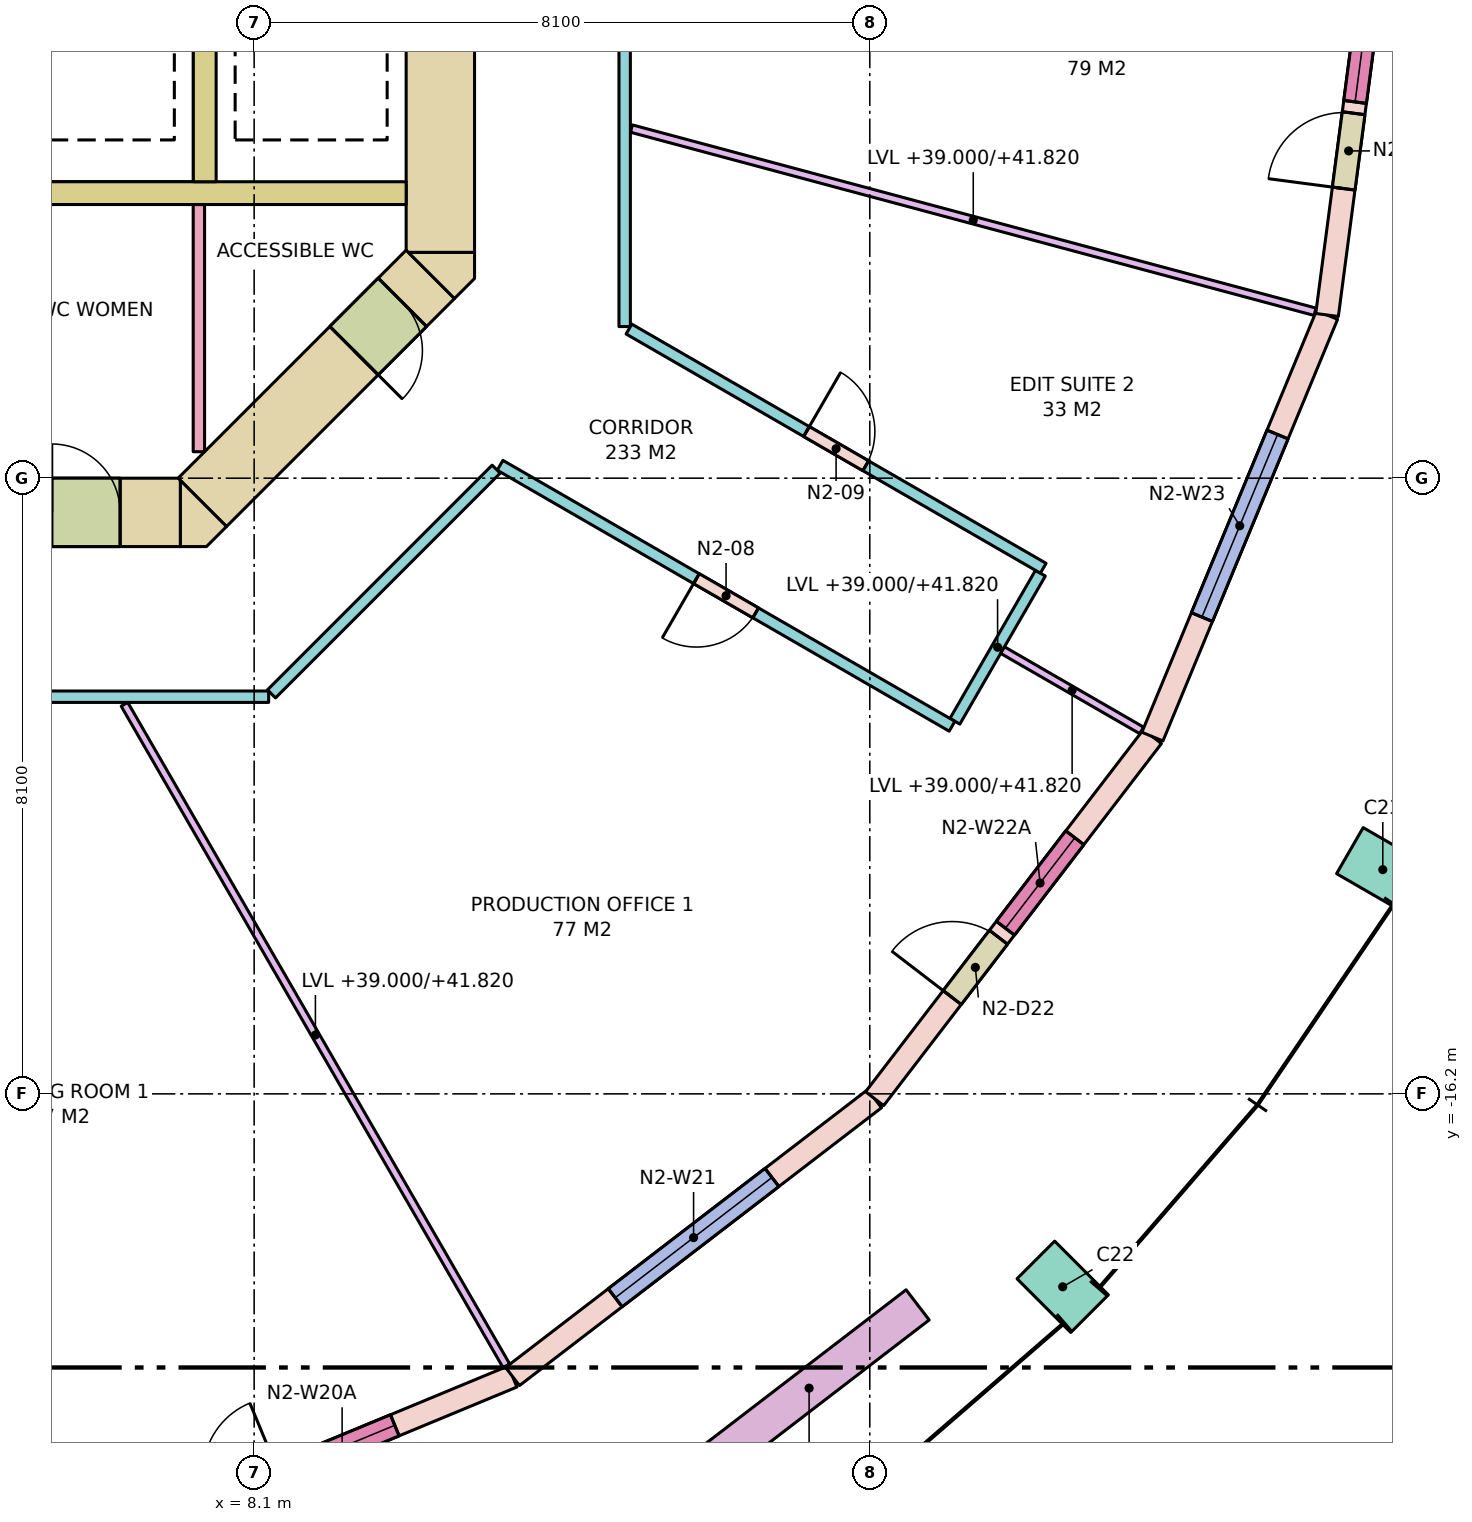
"""IFC4 building model, lengths in metres.
Left out: names, types, materials, properties, quantities, classifications, styles, units other than length and angle.
Written with IfcOpenShell. Run it as: python <this file> out.ifc"""

import sys

from ifc_helpers import new_model, si_unit, direction, frame, frame_2d, origin, origin_2d, place, context, subcontext, project, spatial, polyline, rectangle, outline, extrude, element, fill, save


model = new_model("IFC4")
c1 = context("Model", 3, precision=1e-05, world=origin(), true_north=direction((0.0, 1.0)))
c2 = subcontext(c1, "Body", "Model", "MODEL_VIEW")
j1 = project(units=[si_unit("LENGTHUNIT", "METRE"), si_unit("PLANEANGLEUNIT", "RADIAN")], contexts=[c1])
p1 = place(None, origin())
s1 = spatial("IfcSite", under=j1, at=p1, CompositionType="ELEMENT")
p2 = place(p1, origin())
s2 = spatial("IfcBuilding", under=s1, at=p2, CompositionType="ELEMENT")
p3 = place(p2, frame((0.0, 0.0, 39.0)))
s3 = spatial("IfcBuildingStorey", under=s2, at=p3, CompositionType="ELEMENT", Elevation=39.0)
for number, where, z_axis, x_axis in (
    (1, (18.738, -18.738, 0.0), (0.0, 0.0, 1.0), (0.707, 0.707, 0.0)),
    (2, (22.95, -13.25, 0.0), (0.0, 0.0, 1.0), (0.5, 0.866, 0.0)),
):
    element("IfcColumn", number, at=place(p3, frame(where, z_axis=z_axis, x_axis=x_axis)), inside=s3, PredefinedType="COLUMN", context=c2, shape_type="SweptSolid", body=[
        extrude(rectangle(XDim=0.7, YDim=1.0, at=origin_2d()), origin(), (0.0, 0.0, 1.0), 4.0),
    ])
p4 = place(p3, frame((-7.13, -8.55, -0.28), z_axis=(0.0, 0.0, 1.0), x_axis=(1.0, 0.0, 0.0)))
e3 = element("IfcWall", 3, at=p4, inside=s3, PredefinedType="SHEAR", context=c2, shape_type="SweptSolid", body=[
    extrude(rectangle(XDim=14.26, YDim=0.9, at=frame_2d((7.13, 0.0))), origin(), (0.0, 0.0, 1.0), 4.0),
])
p5 = place(p4, frame((8.08, 0.0, 0.28)))
e4 = element("IfcOpeningElement", 4, at=p5, cuts=e3, PredefinedType="OPENING", context=c2, shape_type="SweptSolid", body=[
    extrude(rectangle(XDim=0.7, YDim=2.1, at=frame_2d((0.35, 1.05))), frame((0.0, 0.46, 0.0), z_axis=(0.0, -1.0, 0.0), x_axis=(1.0, 0.0, 0.0)), (0.0, 0.0, 1.0), 0.92),
])
p6 = place(p4, frame((6.205, 0.0, 0.28)))
e5 = element("IfcOpeningElement", 5, at=p6, cuts=e3, PredefinedType="OPENING", context=c2, shape_type="SweptSolid", body=[
    extrude(rectangle(XDim=0.9, YDim=2.1, at=frame_2d((0.45, 1.05))), frame((0.0, 0.46, 0.0), z_axis=(0.0, -1.0, 0.0), x_axis=(1.0, 0.0, 0.0)), (0.0, 0.0, 1.0), 0.92),
])
p7 = place(p4, frame((9.967, 0.0, 0.28)))
e6 = element("IfcOpeningElement", 6, at=p7, cuts=e3, PredefinedType="OPENING", context=c2, shape_type="SweptSolid", body=[
    extrude(rectangle(XDim=0.9, YDim=2.1, at=frame_2d((0.45, 1.05))), frame((0.0, 0.46, 0.0), z_axis=(0.0, -1.0, 0.0), x_axis=(1.0, 0.0, 0.0)), (0.0, 0.0, 1.0), 0.92),
])
p8 = place(p4, frame((12.567, 0.0, 0.28)))
e7 = element("IfcOpeningElement", 7, at=p8, cuts=e3, PredefinedType="OPENING", context=c2, shape_type="SweptSolid", body=[
    extrude(rectangle(XDim=0.9, YDim=2.1, at=frame_2d((0.45, 1.05))), frame((0.0, 0.46, 0.0), z_axis=(0.0, -1.0, 0.0), x_axis=(1.0, 0.0, 0.0)), (0.0, 0.0, 1.0), 0.92),
])
p9 = place(p3, frame((10.55, -5.13, -0.28), z_axis=(0.0, 0.0, 1.0), x_axis=(0.0, 1.0, 0.0)))
e8 = element("IfcWall", 8, at=p9, inside=s3, PredefinedType="SHEAR", context=c2, shape_type="SweptSolid", body=[
    extrude(rectangle(XDim=10.26, YDim=0.9, at=frame_2d((5.13, 0.0))), origin(), (0.0, 0.0, 1.0), 4.0),
])
p10 = place(p9, frame((4.13, 0.0, 0.28)))
e9 = element("IfcOpeningElement", 9, at=p10, cuts=e8, PredefinedType="OPENING", context=c2, shape_type="SweptSolid", body=[
    extrude(rectangle(XDim=2.0, YDim=2.1, at=frame_2d((1.0, 1.05))), frame((0.0, 0.46, 0.0), z_axis=(0.0, -1.0, 0.0), x_axis=(1.0, 0.0, 0.0)), (0.0, 0.0, 1.0), 0.92),
])
p11 = place(p3, frame((10.418, -5.418, -0.28), z_axis=(0.0, 0.0, 1.0), x_axis=(-0.707106781187, -0.707106781187, 0.0)))
e10 = element("IfcWall", 10, at=p11, inside=s3, PredefinedType="SHEAR", context=c2, shape_type="SweptSolid", body=[
    extrude(rectangle(XDim=4.243, YDim=0.9, at=frame_2d((2.121, 0.0))), origin(), (0.0, 0.0, 1.0), 4.0),
])
p12 = place(p11, frame((0.52, 0.0, 0.28)))
e11 = element("IfcOpeningElement", 11, at=p12, cuts=e10, PredefinedType="OPENING", context=c2, shape_type="SweptSolid", body=[
    extrude(rectangle(XDim=0.9, YDim=2.1, at=frame_2d((0.45, 1.05))), frame((0.0, 0.46, 0.0), z_axis=(0.0, -1.0, 0.0), x_axis=(1.0, 0.0, 0.0)), (0.0, 0.0, 1.0), 0.92),
])
p13 = place(p3, frame((0.0, 0.0, -0.28)))
e12 = element("IfcWall", 12, at=p13, inside=s3, PredefinedType="SHEAR", context=c2, shape_type="SweptSolid", body=[
    extrude(outline(polyline([(7.473, -9.0), (7.13, -9.0), (7.13, -8.13), (7.736, -8.736), (7.473, -9.0)])), origin(), (0.0, 0.0, 1.0), 4.0),
])
p14 = place(p3, frame((0.0, 0.0, -0.28)))
e13 = element("IfcWall", 13, at=p14, inside=s3, PredefinedType="SHEAR", context=c2, shape_type="SweptSolid", body=[
    extrude(outline(polyline([(11.0, -5.473), (10.736, -5.736), (10.13, -5.13), (11.0, -5.13), (11.0, -5.473)])), origin(), (0.0, 0.0, 1.0), 4.0),
])
p15 = place(p3, frame((2.0, -4.35, 0.0), z_axis=(0.0, 0.0, 1.0), x_axis=(1.0, 0.0, 0.0)))
e14 = element("IfcWall", 14, at=p15, inside=s3, PredefinedType="SOLIDWALL", context=c2, shape_type="SweptSolid", body=[
    extrude(rectangle(XDim=8.1, YDim=0.3, at=frame_2d((4.05, 0.0))), origin(), (0.0, 0.0, 1.0), 3.72),
])
p16 = place(p3, frame((7.45, -4.2, 0.0), z_axis=(0.0, 0.0, 1.0), x_axis=(0.0, 1.0, 0.0)))
e15 = element("IfcWall", 15, at=p16, inside=s3, PredefinedType="SOLIDWALL", context=c2, shape_type="SweptSolid", body=[
    extrude(rectangle(XDim=2.4, YDim=0.3, at=frame_2d((1.2, 0.0))), origin(), (0.0, 0.0, 1.0), 3.72),
])
p17 = place(p3, frame((5.953, -22.216, 0.0), z_axis=(0.0, 0.0, 1.0), x_axis=(0.923884511653, 0.382671411433, 0.0)))
e16 = element("IfcWall", 16, at=p17, inside=s3, PredefinedType="STANDARD", context=c2, shape_type="SweptSolid", body=[
    extrude(rectangle(XDim=6.004, YDim=0.3, at=frame_2d((3.002, 0.0))), origin(), (0.0, 0.0, 1.0), 3.72),
])
p18 = place(p17, frame((1.677, 0.0, 0.0)))
e17 = element("IfcOpeningElement", 17, at=p18, cuts=e16, PredefinedType="OPENING", context=c2, shape_type="SweptSolid", body=[
    extrude(rectangle(XDim=1.0, YDim=2.4, at=frame_2d((0.5, 1.2))), frame((0.0, 0.16, 0.0), z_axis=(0.0, -1.0, 0.0), x_axis=(1.0, 0.0, 0.0)), (0.0, 0.0, 1.0), 0.32),
])
p19 = place(p17, frame((2.827, 0.0, 0.8)))
e18 = element("IfcOpeningElement", 18, at=p19, cuts=e16, PredefinedType="OPENING", context=c2, shape_type="SweptSolid", body=[
    extrude(rectangle(XDim=1.5, YDim=2.7, at=frame_2d((0.75, 1.35))), frame((0.0, 0.16, 0.0), z_axis=(0.0, -1.0, 0.0), x_axis=(1.0, 0.0, 0.0)), (0.0, 0.0, 1.0), 0.32),
])
p20 = place(p3, frame((11.5, -19.919, 0.0), z_axis=(0.0, 0.0, 1.0), x_axis=(0.793339924758, 0.608778912074, 0.0)))
e19 = element("IfcWall", 19, at=p20, inside=s3, PredefinedType="STANDARD", context=c2, shape_type="SweptSolid", body=[
    extrude(rectangle(XDim=6.004, YDim=0.3, at=frame_2d((3.002, 0.0))), origin(), (0.0, 0.0, 1.0), 3.72),
])
p21 = place(p20, frame((1.702, 0.0, 0.8)))
e20 = element("IfcOpeningElement", 20, at=p21, cuts=e19, PredefinedType="OPENING", context=c2, shape_type="SweptSolid", body=[
    extrude(rectangle(XDim=2.6, YDim=2.7, at=frame_2d((1.3, 1.35))), frame((0.0, 0.16, 0.0), z_axis=(0.0, -1.0, 0.0), x_axis=(1.0, 0.0, 0.0)), (0.0, 0.0, 1.0), 0.32),
])
p22 = place(p3, frame((16.263, -16.263, 0.0), z_axis=(0.0, 0.0, 1.0), x_axis=(0.608778912074, 0.793339924758, 0.0)))
e21 = element("IfcWall", 21, at=p22, inside=s3, PredefinedType="STANDARD", context=c2, shape_type="SweptSolid", body=[
    extrude(rectangle(XDim=6.004, YDim=0.3, at=frame_2d((3.002, 0.0))), origin(), (0.0, 0.0, 1.0), 3.72),
])
p23 = place(p22, frame((1.677, 0.0, 0.0)))
e22 = element("IfcOpeningElement", 22, at=p23, cuts=e21, PredefinedType="OPENING", context=c2, shape_type="SweptSolid", body=[
    extrude(rectangle(XDim=1.0, YDim=2.4, at=frame_2d((0.5, 1.2))), frame((0.0, 0.16, 0.0), z_axis=(0.0, -1.0, 0.0), x_axis=(1.0, 0.0, 0.0)), (0.0, 0.0, 1.0), 0.32),
])
p24 = place(p22, frame((2.827, 0.0, 0.8)))
e23 = element("IfcOpeningElement", 23, at=p24, cuts=e21, PredefinedType="OPENING", context=c2, shape_type="SweptSolid", body=[
    extrude(rectangle(XDim=1.5, YDim=2.7, at=frame_2d((0.75, 1.35))), frame((0.0, 0.16, 0.0), z_axis=(0.0, -1.0, 0.0), x_axis=(1.0, 0.0, 0.0)), (0.0, 0.0, 1.0), 0.32),
])
p25 = place(p3, frame((19.919, -11.5, 0.0), z_axis=(0.0, 0.0, 1.0), x_axis=(0.382671411433, 0.923884511653, 0.0)))
e24 = element("IfcWall", 24, at=p25, inside=s3, PredefinedType="STANDARD", context=c2, shape_type="SweptSolid", body=[
    extrude(rectangle(XDim=6.004, YDim=0.3, at=frame_2d((3.002, 0.0))), origin(), (0.0, 0.0, 1.0), 3.72),
])
p26 = place(p25, frame((1.702, 0.0, 0.8)))
e25 = element("IfcOpeningElement", 25, at=p26, cuts=e24, PredefinedType="OPENING", context=c2, shape_type="SweptSolid", body=[
    extrude(rectangle(XDim=2.6, YDim=2.7, at=frame_2d((1.3, 1.35))), frame((0.0, 0.16, 0.0), z_axis=(0.0, -1.0, 0.0), x_axis=(1.0, 0.0, 0.0)), (0.0, 0.0, 1.0), 0.32),
])
p27 = place(p3, frame((22.216, -5.953, 0.0), z_axis=(0.0, 0.0, 1.0), x_axis=(0.130522880875, 0.991445297315, 0.0)))
e26 = element("IfcWall", 26, at=p27, inside=s3, PredefinedType="STANDARD", context=c2, shape_type="SweptSolid", body=[
    extrude(rectangle(XDim=6.004, YDim=0.3, at=frame_2d((3.002, 0.0))), origin(), (0.0, 0.0, 1.0), 3.72),
])
p28 = place(p27, frame((1.677, 0.0, 0.0)))
e27 = element("IfcOpeningElement", 27, at=p28, cuts=e26, PredefinedType="OPENING", context=c2, shape_type="SweptSolid", body=[
    extrude(rectangle(XDim=1.0, YDim=2.4, at=frame_2d((0.5, 1.2))), frame((0.0, 0.16, 0.0), z_axis=(0.0, -1.0, 0.0), x_axis=(1.0, 0.0, 0.0)), (0.0, 0.0, 1.0), 0.32),
])
p29 = place(p27, frame((2.827, 0.0, 0.8)))
e28 = element("IfcOpeningElement", 28, at=p29, cuts=e26, PredefinedType="OPENING", context=c2, shape_type="SweptSolid", body=[
    extrude(rectangle(XDim=1.5, YDim=2.7, at=frame_2d((0.75, 1.35))), frame((0.0, 0.16, 0.0), z_axis=(0.0, -1.0, 0.0), x_axis=(1.0, 0.0, 0.0)), (0.0, 0.0, 1.0), 0.32),
])
p30 = place(p3, frame((13.974, -21.167, 0.0), z_axis=(0.0, 0.0, 1.0), x_axis=(0.793359599829, 0.608753271334, 0.0)))
e29 = element("IfcWall", 29, at=p30, inside=s3, PredefinedType="PARAPET", context=c2, shape_type="SweptSolid", body=[
    extrude(rectangle(XDim=3.6, YDim=0.5, at=frame_2d((1.8, 0.0))), origin(), (0.0, 0.0, 1.0), 0.9),
])
p31 = place(p3, frame((7.373, -7.752, 0.0), z_axis=(0.0, 0.0, 1.0), x_axis=(0.0, 1.0, 0.0)))
e30 = element("IfcWall", 30, at=p31, inside=s3, PredefinedType="PARTITIONING", context=c2, shape_type="SweptSolid", body=[
    extrude(rectangle(XDim=3.252, YDim=0.15, at=frame_2d((1.626, 0.0))), origin(), (0.0, 0.0, 1.0), 3.72),
])
p32 = place(p3, frame((18.445, -9.35, 0.0), z_axis=(0.0, 0.0, 1.0), x_axis=(-0.500013631625, -0.866017533419, 0.0)))
e31 = element("IfcWall", 31, at=p32, inside=s3, PredefinedType="PARTITIONING", context=c2, shape_type="SweptSolid", body=[
    extrude(rectangle(XDim=2.25, YDim=0.15, at=frame_2d((1.125, 0.0))), origin(), (0.0, 0.0, 1.0), 2.82),
])
p33 = place(p3, frame((17.282, -11.364, 0.0), z_axis=(0.0, 0.0, 1.0), x_axis=(-0.86603341746, 0.49998611965, 0.0)))
e32 = element("IfcWall", 32, at=p33, inside=s3, PredefinedType="PARTITIONING", context=c2, shape_type="SweptSolid", body=[
    extrude(rectangle(XDim=6.866, YDim=0.15, at=frame_2d((3.433, 0.0))), origin(), (0.0, 0.0, 1.0), 3.72),
])
p34 = place(p33, frame((2.983, 0.0, 0.0)))
e33 = element("IfcOpeningElement", 33, at=p34, cuts=e32, PredefinedType="OPENING", context=c2, shape_type="SweptSolid", body=[
    extrude(rectangle(XDim=0.9, YDim=2.1, at=frame_2d((0.45, 1.05))), frame((0.0, 0.085, 0.0), z_axis=(0.0, -1.0, 0.0), x_axis=(1.0, 0.0, 0.0)), (0.0, 0.0, 1.0), 0.17),
])
p35 = place(p3, frame((11.284, -7.981, 0.0), z_axis=(0.0, 0.0, 1.0), x_axis=(-0.707077584218, -0.707135976949, 0.0)))
e34 = element("IfcWall", 34, at=p35, inside=s3, PredefinedType="PARTITIONING", context=c2, shape_type="SweptSolid", body=[
    extrude(rectangle(XDim=4.181, YDim=0.15, at=frame_2d((2.09, 0.0))), origin(), (0.0, 0.0, 1.0), 2.82),
])
p36 = place(p3, frame((8.291, -10.975, 0.0), z_axis=(0.0, 0.0, 1.0), x_axis=(-1.0, 0.0, 0.0)))
e35 = element("IfcWall", 35, at=p36, inside=s3, PredefinedType="PARTITIONING", context=c2, shape_type="SweptSolid", body=[
    extrude(rectangle(XDim=7.016, YDim=0.15, at=frame_2d((3.508, 0.0))), origin(), (0.0, 0.0, 1.0), 2.82),
])
p37 = place(p3, frame((12.975, 2.234, 0.0), z_axis=(0.0, 0.0, 1.0), x_axis=(0.0, -1.0, 0.0)))
e36 = element("IfcWall", 36, at=p37, inside=s3, PredefinedType="PARTITIONING", context=c2, shape_type="SweptSolid", body=[
    extrude(rectangle(XDim=8.34, YDim=0.15, at=frame_2d((4.17, 0.0))), origin(), (0.0, 0.0, 1.0), 2.82),
])
p38 = place(p3, frame((13.031, -6.138, 0.0), z_axis=(0.0, 0.0, 1.0), x_axis=(0.86602669382, -0.499997765587, 0.0)))
e37 = element("IfcWall", 37, at=p38, inside=s3, PredefinedType="PARTITIONING", context=c2, shape_type="SweptSolid", body=[
    extrude(rectangle(XDim=6.294, YDim=0.15, at=frame_2d((3.147, 0.0))), origin(), (0.0, 0.0, 1.0), 3.72),
])
p39 = place(p38, frame((2.697, 0.0, 0.0)))
e38 = element("IfcOpeningElement", 38, at=p39, cuts=e37, PredefinedType="OPENING", context=c2, shape_type="SweptSolid", body=[
    extrude(rectangle(XDim=0.9, YDim=2.1, at=frame_2d((0.45, 1.05))), frame((0.0, 0.085, 0.0), z_axis=(0.0, -1.0, 0.0), x_axis=(1.0, 0.0, 0.0)), (0.0, 0.0, 1.0), 0.17),
])
p40 = place(p3, frame((6.394, -11.075, 0.0), z_axis=(0.0, 0.0, 1.0), x_axis=(0.500024592647, -0.866011204747, 0.0)))
e39 = element("IfcWall", 39, at=p40, inside=s3, PredefinedType="PARTITIONING", context=c2, shape_type="SweptSolid", body=[
    extrude(rectangle(XDim=10.049, YDim=0.1, at=frame_2d((5.024, 0.0))), origin(), (0.0, 0.0, 1.0), 2.82),
])
p41 = place(p3, frame((17.947, -10.362, 0.0), z_axis=(0.0, 0.0, 1.0), x_axis=(0.865987390988, -0.500065834316, 0.0)))
e40 = element("IfcWall", 40, at=p41, inside=s3, PredefinedType="PARTITIONING", context=c2, shape_type="SweptSolid", body=[
    extrude(rectangle(XDim=2.113, YDim=0.1, at=frame_2d((1.057, 0.0))), origin(), (0.0, 0.0, 1.0), 2.82),
])
p42 = place(p3, frame((13.064, -3.5, 0.0), z_axis=(0.0, 0.0, 1.0), x_axis=(0.965922655056, -0.258830880017, 0.0)))
e41 = element("IfcWall", 41, at=p42, inside=s3, PredefinedType="PARTITIONING", context=c2, shape_type="SweptSolid", body=[
    extrude(rectangle(XDim=9.312, YDim=0.1, at=frame_2d((4.656, 0.0))), origin(), (0.0, 0.0, 1.0), 2.82),
])
p43 = place(p19, origin())
e42 = element("IfcWindow", 42, at=p43, inside=s3, PartitioningType="SINGLE_PANEL", PredefinedType="WINDOW", context=c2, shape_type="SweptSolid", body=[
    extrude(rectangle(XDim=1.5, YDim=2.7, at=frame_2d((0.75, 1.35))), frame((0.0, 0.03, 0.0), z_axis=(0.0, -1.0, 0.0), x_axis=(1.0, 0.0, 0.0)), (0.0, 0.0, 1.0), 0.06),
])
fill(e18, e42)
p44 = place(p21, origin())
e43 = element("IfcWindow", 43, at=p44, inside=s3, PartitioningType="SINGLE_PANEL", PredefinedType="WINDOW", context=c2, shape_type="SweptSolid", body=[
    extrude(rectangle(XDim=2.6, YDim=2.7, at=frame_2d((1.3, 1.35))), frame((0.0, 0.03, 0.0), z_axis=(0.0, -1.0, 0.0), x_axis=(1.0, 0.0, 0.0)), (0.0, 0.0, 1.0), 0.06),
])
fill(e20, e43)
p45 = place(p23, origin())
e44 = element("IfcDoor", 44, at=p45, inside=s3, OperationType="SINGLE_SWING_LEFT", PredefinedType="DOOR", context=c2, shape_type="SweptSolid", body=[
    extrude(rectangle(XDim=1.0, YDim=2.4, at=frame_2d((0.5, 1.2))), frame((0.0, 0.025, 0.0), z_axis=(0.0, -1.0, 0.0), x_axis=(1.0, 0.0, 0.0)), (0.0, 0.0, 1.0), 0.05),
])
fill(e22, e44)
p46 = place(p24, origin())
e45 = element("IfcWindow", 45, at=p46, inside=s3, PartitioningType="SINGLE_PANEL", PredefinedType="WINDOW", context=c2, shape_type="SweptSolid", body=[
    extrude(rectangle(XDim=1.5, YDim=2.7, at=frame_2d((0.75, 1.35))), frame((0.0, 0.03, 0.0), z_axis=(0.0, -1.0, 0.0), x_axis=(1.0, 0.0, 0.0)), (0.0, 0.0, 1.0), 0.06),
])
fill(e23, e45)
p47 = place(p26, origin())
e46 = element("IfcWindow", 46, at=p47, inside=s3, PartitioningType="SINGLE_PANEL", PredefinedType="WINDOW", context=c2, shape_type="SweptSolid", body=[
    extrude(rectangle(XDim=2.6, YDim=2.7, at=frame_2d((1.3, 1.35))), frame((0.0, 0.03, 0.0), z_axis=(0.0, -1.0, 0.0), x_axis=(1.0, 0.0, 0.0)), (0.0, 0.0, 1.0), 0.06),
])
fill(e25, e46)
p48 = place(p28, origin())
e47 = element("IfcDoor", 47, at=p48, inside=s3, OperationType="SINGLE_SWING_LEFT", PredefinedType="DOOR", context=c2, shape_type="SweptSolid", body=[
    extrude(rectangle(XDim=1.0, YDim=2.4, at=frame_2d((0.5, 1.2))), frame((0.0, 0.025, 0.0), z_axis=(0.0, -1.0, 0.0), x_axis=(1.0, 0.0, 0.0)), (0.0, 0.0, 1.0), 0.05),
])
fill(e27, e47)
p49 = place(p29, origin())
e48 = element("IfcWindow", 48, at=p49, inside=s3, PartitioningType="SINGLE_PANEL", PredefinedType="WINDOW", context=c2, shape_type="SweptSolid", body=[
    extrude(rectangle(XDim=1.5, YDim=2.7, at=frame_2d((0.75, 1.35))), frame((0.0, 0.03, 0.0), z_axis=(0.0, -1.0, 0.0), x_axis=(1.0, 0.0, 0.0)), (0.0, 0.0, 1.0), 0.06),
])
fill(e28, e48)
p50 = place(p8, origin())
e49 = element("IfcDoor", 49, at=p50, inside=s3, OperationType="SINGLE_SWING_LEFT", PredefinedType="DOOR", context=c2, shape_type="SweptSolid", body=[
    extrude(rectangle(XDim=0.9, YDim=2.1, at=frame_2d((0.45, 1.05))), frame((0.0, 0.025, 0.0), z_axis=(0.0, -1.0, 0.0), x_axis=(1.0, 0.0, 0.0)), (0.0, 0.0, 1.0), 0.05),
])
fill(e7, e49)
p51 = place(p12, origin())
e50 = element("IfcDoor", 50, at=p51, inside=s3, OperationType="SINGLE_SWING_RIGHT", PredefinedType="DOOR", context=c2, shape_type="SweptSolid", body=[
    extrude(rectangle(XDim=0.9, YDim=2.1, at=frame_2d((0.45, 1.05))), frame((0.0, 0.025, 0.0), z_axis=(0.0, -1.0, 0.0), x_axis=(1.0, 0.0, 0.0)), (0.0, 0.0, 1.0), 0.05),
])
fill(e11, e50)
p52 = place(p34, origin())
e51 = element("IfcDoor", 51, at=p52, inside=s3, OperationType="SINGLE_SWING_RIGHT", PredefinedType="DOOR", context=c2, shape_type="SweptSolid", body=[
    extrude(rectangle(XDim=0.9, YDim=2.1, at=frame_2d((0.45, 1.05))), frame((0.0, 0.025, 0.0), z_axis=(0.0, -1.0, 0.0), x_axis=(1.0, 0.0, 0.0)), (0.0, 0.0, 1.0), 0.05),
])
fill(e33, e51)
p53 = place(p39, origin())
e52 = element("IfcDoor", 52, at=p53, inside=s3, OperationType="SINGLE_SWING_LEFT", PredefinedType="DOOR", context=c2, shape_type="SweptSolid", body=[
    extrude(rectangle(XDim=0.9, YDim=2.1, at=frame_2d((0.45, 1.05))), frame((0.0, 0.025, 0.0), z_axis=(0.0, -1.0, 0.0), x_axis=(1.0, 0.0, 0.0)), (0.0, 0.0, 1.0), 0.05),
])
fill(e38, e52)
save(model, sys.argv[1])
